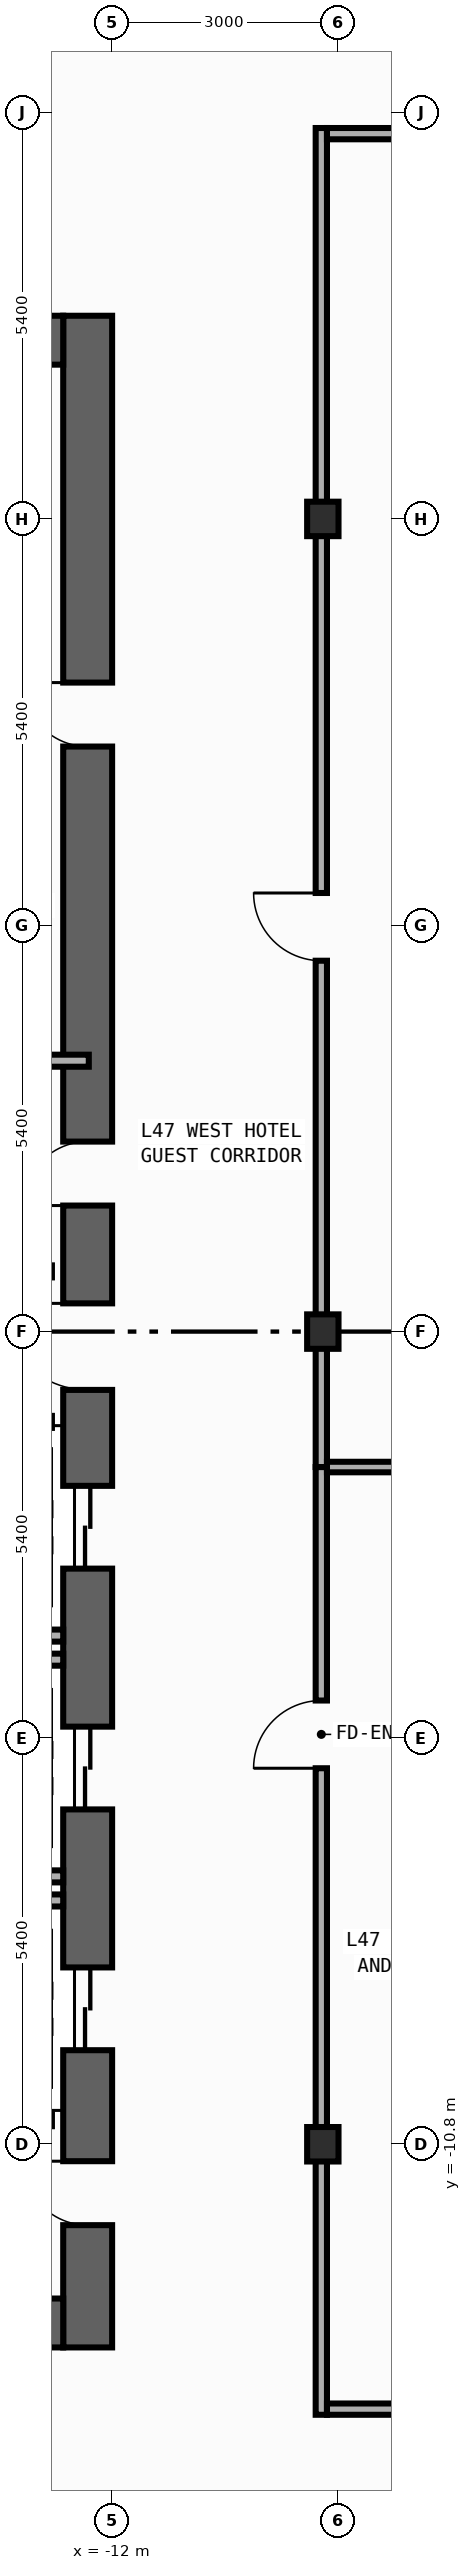
"""IFC4 building model, lengths in metres.
Left out: names, types, materials, properties, quantities, classifications, styles, units other than length and angle.
Written with IfcOpenShell. Run it as: python <this file> out.ifc"""

import sys

from ifc_helpers import new_model, si_unit, direction, frame, frame_2d, origin, origin_2d, place, context, subcontext, project, spatial, rectangle, i_section, extrude, element, fill, save


model = new_model("IFC4")
c1 = context("Model", 3, precision=1e-05, world=origin(), true_north=direction((0.0, 1.0)))
c2 = subcontext(c1, "Body", "Model", "MODEL_VIEW")
j1 = project(units=[si_unit("LENGTHUNIT", "METRE"), si_unit("PLANEANGLEUNIT", "RADIAN")], contexts=[c1])
p1 = place(None, origin())
s1 = spatial("IfcSite", under=j1, at=p1, CompositionType="ELEMENT")
p2 = place(p1, origin())
s2 = spatial("IfcBuilding", under=s1, at=p2, CompositionType="ELEMENT")
p3 = place(p2, frame((0.0, 0.0, 203.0)))
s3 = spatial("IfcBuildingStorey", under=s2, at=p3, CompositionType="ELEMENT", Elevation=203.0)
p4 = place(p3, frame((-12.325, -13.5, 0.0), z_axis=(0.0, 0.0, 1.0), x_axis=(0.0, 1.0, 0.0)))
e1 = element("IfcWall", 1, at=p4, inside=s3, PredefinedType="SHEAR", context=c2, shape_type="SweptSolid", body=[
    extrude(rectangle(XDim=27.0, YDim=0.65, at=frame_2d((13.5, 0.0))), origin(), (0.0, 0.0, 1.0), 3.54),
])
p5 = place(p4, frame((10.35, 0.0, 0.0)))
e2 = element("IfcOpeningElement", 2, at=p5, cuts=e1, PredefinedType="OPENING", context=c2, shape_type="SweptSolid", body=[
    extrude(rectangle(XDim=1.1, YDim=2.2, at=frame_2d((0.55, 1.1))), frame((0.0, 0.335, 0.0), z_axis=(0.0, -1.0, 0.0), x_axis=(1.0, 0.0, 0.0)), (0.0, 0.0, 1.0), 0.67),
])
p6 = place(p4, frame((7.15, 0.0, 0.0)))
e3 = element("IfcOpeningElement", 3, at=p6, cuts=e1, PredefinedType="OPENING", context=c2, shape_type="SweptSolid", body=[
    extrude(rectangle(XDim=1.1, YDim=2.2, at=frame_2d((0.55, 1.1))), frame((0.0, 0.335, 0.0), z_axis=(0.0, -1.0, 0.0), x_axis=(1.0, 0.0, 0.0)), (0.0, 0.0, 1.0), 0.67),
])
p7 = place(p4, frame((3.95, 0.0, 0.0)))
e4 = element("IfcOpeningElement", 4, at=p7, cuts=e1, PredefinedType="OPENING", context=c2, shape_type="SweptSolid", body=[
    extrude(rectangle(XDim=1.1, YDim=2.2, at=frame_2d((0.55, 1.1))), frame((0.0, 0.335, 0.0), z_axis=(0.0, -1.0, 0.0), x_axis=(1.0, 0.0, 0.0)), (0.0, 0.0, 1.0), 0.67),
])
p8 = place(p4, frame((15.175, 0.0, 0.0)))
e5 = element("IfcOpeningElement", 5, at=p8, cuts=e1, PredefinedType="OPENING", context=c2, shape_type="SweptSolid", body=[
    extrude(rectangle(XDim=0.85, YDim=2.1, at=frame_2d((0.425, 1.05))), frame((0.0, 0.335, 0.0), z_axis=(0.0, -1.0, 0.0), x_axis=(1.0, 0.0, 0.0)), (0.0, 0.0, 1.0), 0.67),
])
p9 = place(p4, frame((21.275, 0.0, 0.0)))
e6 = element("IfcOpeningElement", 6, at=p9, cuts=e1, PredefinedType="OPENING", context=c2, shape_type="SweptSolid", body=[
    extrude(rectangle(XDim=0.85, YDim=2.1, at=frame_2d((0.425, 1.05))), frame((0.0, 0.335, 0.0), z_axis=(0.0, -1.0, 0.0), x_axis=(1.0, 0.0, 0.0)), (0.0, 0.0, 1.0), 0.67),
])
p10 = place(p4, frame((12.725, 0.0, 0.0)))
e7 = element("IfcOpeningElement", 7, at=p10, cuts=e1, PredefinedType="OPENING", context=c2, shape_type="SweptSolid", body=[
    extrude(rectangle(XDim=1.15, YDim=2.2, at=frame_2d((0.575, 1.1))), frame((0.0, 0.335, 0.0), z_axis=(0.0, -1.0, 0.0), x_axis=(1.0, 0.0, 0.0)), (0.0, 0.0, 1.0), 0.67),
])
p11 = place(p4, frame((1.625, 0.0, 0.0)))
e8 = element("IfcOpeningElement", 8, at=p11, cuts=e1, PredefinedType="OPENING", context=c2, shape_type="SweptSolid", body=[
    extrude(rectangle(XDim=0.85, YDim=2.1, at=frame_2d((0.425, 1.05))), frame((0.0, 0.335, 0.0), z_axis=(0.0, -1.0, 0.0), x_axis=(1.0, 0.0, 0.0)), (0.0, 0.0, 1.0), 0.67),
])
for number, where, z_axis, x_axis in (
    (9, (-19.75, -13.175, 0.0), (0.0, 0.0, 1.0), (1.0, 0.0, 0.0)),
    (10, (-19.75, 13.175, 0.0), (0.0, 0.0, 1.0), (1.0, 0.0, 0.0)),
):
    element("IfcWall", number, at=place(p3, frame(where, z_axis=z_axis, x_axis=x_axis)), inside=s3, PredefinedType="SHEAR", context=c2, shape_type="SweptSolid", body=[
        extrude(rectangle(XDim=7.1, YDim=0.65, at=frame_2d((3.55, 0.0))), origin(), (0.0, 0.0, 1.0), 3.54),
    ])
for number, where, z_axis, x_axis in (
    (11, (-9.2, -10.8, 0.0), (0.0, 0.0, 1.0), (1.0, 0.0, 0.0)),
    (12, (-9.2, 0.0, 0.0), (0.0, 0.0, 1.0), (1.0, 0.0, 0.0)),
    (13, (-9.2, 10.8, 0.0), (0.0, 0.0, 1.0), (1.0, 0.0, 0.0)),
):
    element("IfcColumn", number, at=place(p3, frame(where, z_axis=z_axis, x_axis=x_axis)), inside=s3, PredefinedType="COLUMN", context=c2, shape_type="SweptSolid", body=[
        extrude(i_section(OverallWidth=0.417, OverallDepth=0.458, WebThickness=0.03, FlangeThickness=0.05, FilletRadius=0.022, at=origin_2d()), origin(), (0.0, 0.0, 1.0), 3.8),
    ])
for number, where, z_axis, x_axis in (
    (14, (-14.99, -4.04, 0.0), (0.0, 0.0, 1.0), (1.0, 0.0, 0.0)),
    (15, (-14.99, -7.24, 0.0), (0.0, 0.0, 1.0), (1.0, 0.0, 0.0)),
    (16, (-14.99, -4.36, 0.0), (0.0, 0.0, 1.0), (1.0, 0.0, 0.0)),
    (17, (-14.99, -7.56, 0.0), (0.0, 0.0, 1.0), (1.0, 0.0, 0.0)),
):
    element("IfcWall", number, at=place(p3, frame(where, z_axis=z_axis, x_axis=x_axis)), inside=s3, PredefinedType="STANDARD", context=c2, shape_type="SweptSolid", body=[
        extrude(rectangle(XDim=2.34, YDim=0.16, at=frame_2d((1.17, 0.0))), origin(), (0.0, 0.0, 1.0), 3.54),
    ])
p12 = place(p3, frame((-15.375, 3.6, 0.0), z_axis=(0.0, 0.0, 1.0), x_axis=(1.0, 0.0, 0.0)))
e18 = element("IfcWall", 18, at=p12, inside=s3, PredefinedType="PARTITIONING", context=c2, shape_type="SweptSolid", body=[
    extrude(rectangle(XDim=3.065, YDim=0.16, at=frame_2d((1.532, 0.0))), origin(), (0.0, 0.0, 1.0), 3.54),
])
p13 = place(p3, frame((-9.22, -14.395, 0.0), z_axis=(0.0, 0.0, 1.0), x_axis=(0.0, 1.0, 0.0)))
e19 = element("IfcWall", 19, at=p13, inside=s3, PredefinedType="PARTITIONING", context=c2, shape_type="SweptSolid", body=[
    extrude(rectangle(XDim=12.595, YDim=0.15, at=frame_2d((6.297, 0.0))), origin(), (0.0, 0.0, 1.0), 2.952),
])
p14 = place(p13, frame((8.592, 0.0, 0.0)))
e20 = element("IfcOpeningElement", 20, at=p14, cuts=e19, PredefinedType="OPENING", context=c2, shape_type="SweptSolid", body=[
    extrude(rectangle(XDim=0.9, YDim=2.15, at=frame_2d((0.45, 1.075))), frame((0.0, 0.085, 0.0), z_axis=(0.0, -1.0, 0.0), x_axis=(1.0, 0.0, 0.0)), (0.0, 0.0, 1.0), 0.17),
])
p15 = place(p3, frame((-9.22, -1.8, 0.0), z_axis=(0.0, 0.0, 1.0), x_axis=(0.0, 1.0, 0.0)))
e21 = element("IfcWall", 21, at=p15, inside=s3, PredefinedType="PARTITIONING", context=c2, shape_type="SweptSolid", body=[
    extrude(rectangle(XDim=17.795, YDim=0.15, at=frame_2d((8.897, 0.0))), origin(), (0.0, 0.0, 1.0), 2.952),
])
p16 = place(p15, frame((6.729, 0.0, 0.0)))
e22 = element("IfcOpeningElement", 22, at=p16, cuts=e21, PredefinedType="OPENING", context=c2, shape_type="SweptSolid", body=[
    extrude(rectangle(XDim=0.9, YDim=2.15, at=frame_2d((0.45, 1.075))), frame((0.0, 0.085, 0.0), z_axis=(0.0, -1.0, 0.0), x_axis=(1.0, 0.0, 0.0)), (0.0, 0.0, 1.0), 0.17),
])
p17 = place(p3, frame((-9.145, 15.92, 0.0), z_axis=(0.0, 0.0, 1.0), x_axis=(1.0, 0.0, 0.0)))
e23 = element("IfcWall", 23, at=p17, inside=s3, PredefinedType="PARTITIONING", context=c2, shape_type="SweptSolid", body=[
    extrude(rectangle(XDim=18.29, YDim=0.15, at=frame_2d((9.145, 0.0))), origin(), (0.0, 0.0, 1.0), 3.54),
])
p18 = place(p17, frame((15.725, 0.0, 0.0)))
e24 = element("IfcOpeningElement", 24, at=p18, cuts=e23, PredefinedType="OPENING", context=c2, shape_type="SweptSolid", body=[
    extrude(rectangle(XDim=0.9, YDim=2.15, at=frame_2d((0.45, 1.075))), frame((0.0, 0.085, 0.0), z_axis=(0.0, -1.0, 0.0), x_axis=(1.0, 0.0, 0.0)), (0.0, 0.0, 1.0), 0.17),
])
p19 = place(p3, frame((-9.145, -14.32, 0.0), z_axis=(0.0, 0.0, 1.0), x_axis=(1.0, 0.0, 0.0)))
e25 = element("IfcWall", 25, at=p19, inside=s3, PredefinedType="PARTITIONING", context=c2, shape_type="SweptSolid", body=[
    extrude(rectangle(XDim=3.025, YDim=0.15, at=frame_2d((1.512, 0.0))), origin(), (0.0, 0.0, 1.0), 3.54),
])
p20 = place(p19, frame((1.665, 0.0, 0.0)))
e26 = element("IfcOpeningElement", 26, at=p20, cuts=e25, PredefinedType="OPENING", context=c2, shape_type="SweptSolid", body=[
    extrude(rectangle(XDim=0.9, YDim=2.15, at=frame_2d((0.45, 1.075))), frame((0.0, 0.085, 0.0), z_axis=(0.0, -1.0, 0.0), x_axis=(1.0, 0.0, 0.0)), (0.0, 0.0, 1.0), 0.17),
])
p21 = place(p3, frame((-9.145, -1.8, 0.0), z_axis=(0.0, 0.0, 1.0), x_axis=(1.0, 0.0, 0.0)))
e27 = element("IfcWall", 27, at=p21, inside=s3, PredefinedType="PARTITIONING", context=c2, shape_type="SweptSolid", body=[
    extrude(rectangle(XDim=3.025, YDim=0.14, at=frame_2d((1.512, 0.0))), origin(), (0.0, 0.0, 1.0), 3.54),
])
p22 = place(p5, origin())
e28 = element("IfcDoor", 28, at=p22, inside=s3, OperationType="DOUBLE_DOOR_SLIDING", PredefinedType="DOOR", context=c2, shape_type="SweptSolid", body=[
    extrude(rectangle(XDim=1.1, YDim=2.2, at=frame_2d((0.55, 1.1))), frame((0.0, 0.025, 0.0), z_axis=(0.0, -1.0, 0.0), x_axis=(1.0, 0.0, 0.0)), (0.0, 0.0, 1.0), 0.05),
])
fill(e2, e28)
p23 = place(p6, origin())
e29 = element("IfcDoor", 29, at=p23, inside=s3, OperationType="DOUBLE_DOOR_SLIDING", PredefinedType="DOOR", context=c2, shape_type="SweptSolid", body=[
    extrude(rectangle(XDim=1.1, YDim=2.2, at=frame_2d((0.55, 1.1))), frame((0.0, 0.025, 0.0), z_axis=(0.0, -1.0, 0.0), x_axis=(1.0, 0.0, 0.0)), (0.0, 0.0, 1.0), 0.05),
])
fill(e3, e29)
p24 = place(p7, origin())
e30 = element("IfcDoor", 30, at=p24, inside=s3, OperationType="DOUBLE_DOOR_SLIDING", PredefinedType="DOOR", context=c2, shape_type="SweptSolid", body=[
    extrude(rectangle(XDim=1.1, YDim=2.2, at=frame_2d((0.55, 1.1))), frame((0.0, 0.025, 0.0), z_axis=(0.0, -1.0, 0.0), x_axis=(1.0, 0.0, 0.0)), (0.0, 0.0, 1.0), 0.05),
])
fill(e4, e30)
p25 = place(p8, origin())
e31 = element("IfcDoor", 31, at=p25, inside=s3, OperationType="SINGLE_SWING_LEFT", PredefinedType="DOOR", context=c2, shape_type="SweptSolid", body=[
    extrude(rectangle(XDim=0.85, YDim=2.1, at=frame_2d((0.425, 1.05))), frame((0.0, 0.025, 0.0), z_axis=(0.0, -1.0, 0.0), x_axis=(1.0, 0.0, 0.0)), (0.0, 0.0, 1.0), 0.05),
])
fill(e5, e31)
p26 = place(p9, origin())
e32 = element("IfcDoor", 32, at=p26, inside=s3, OperationType="SINGLE_SWING_RIGHT", PredefinedType="DOOR", context=c2, shape_type="SweptSolid", body=[
    extrude(rectangle(XDim=0.85, YDim=2.1, at=frame_2d((0.425, 1.05))), frame((0.0, 0.025, 0.0), z_axis=(0.0, -1.0, 0.0), x_axis=(1.0, 0.0, 0.0)), (0.0, 0.0, 1.0), 0.05),
])
fill(e6, e32)
p27 = place(p10, origin())
e33 = element("IfcDoor", 33, at=p27, inside=s3, OperationType="SINGLE_SWING_RIGHT", PredefinedType="DOOR", context=c2, shape_type="SweptSolid", body=[
    extrude(rectangle(XDim=1.15, YDim=2.2, at=frame_2d((0.575, 1.1))), frame((0.0, 0.025, 0.0), z_axis=(0.0, -1.0, 0.0), x_axis=(1.0, 0.0, 0.0)), (0.0, 0.0, 1.0), 0.05),
])
fill(e7, e33)
p28 = place(p11, origin())
e34 = element("IfcDoor", 34, at=p28, inside=s3, OperationType="SINGLE_SWING_RIGHT", PredefinedType="DOOR", context=c2, shape_type="SweptSolid", body=[
    extrude(rectangle(XDim=0.85, YDim=2.1, at=frame_2d((0.425, 1.05))), frame((0.0, 0.025, 0.0), z_axis=(0.0, -1.0, 0.0), x_axis=(1.0, 0.0, 0.0)), (0.0, 0.0, 1.0), 0.05),
])
fill(e8, e34)
p29 = place(p14, origin())
e35 = element("IfcDoor", 35, at=p29, inside=s3, OperationType="SINGLE_SWING_LEFT", PredefinedType="DOOR", context=c2, shape_type="SweptSolid", body=[
    extrude(rectangle(XDim=0.9, YDim=2.15, at=frame_2d((0.45, 1.075))), frame((0.0, 0.025, 0.0), z_axis=(0.0, -1.0, 0.0), x_axis=(1.0, 0.0, 0.0)), (0.0, 0.0, 1.0), 0.05),
])
fill(e20, e35)
p30 = place(p16, origin())
e36 = element("IfcDoor", 36, at=p30, inside=s3, OperationType="SINGLE_SWING_RIGHT", PredefinedType="DOOR", context=c2, shape_type="SweptSolid", body=[
    extrude(rectangle(XDim=0.9, YDim=2.15, at=frame_2d((0.45, 1.075))), frame((0.0, 0.025, 0.0), z_axis=(0.0, -1.0, 0.0), x_axis=(1.0, 0.0, 0.0)), (0.0, 0.0, 1.0), 0.05),
])
fill(e22, e36)
save(model, sys.argv[1])
